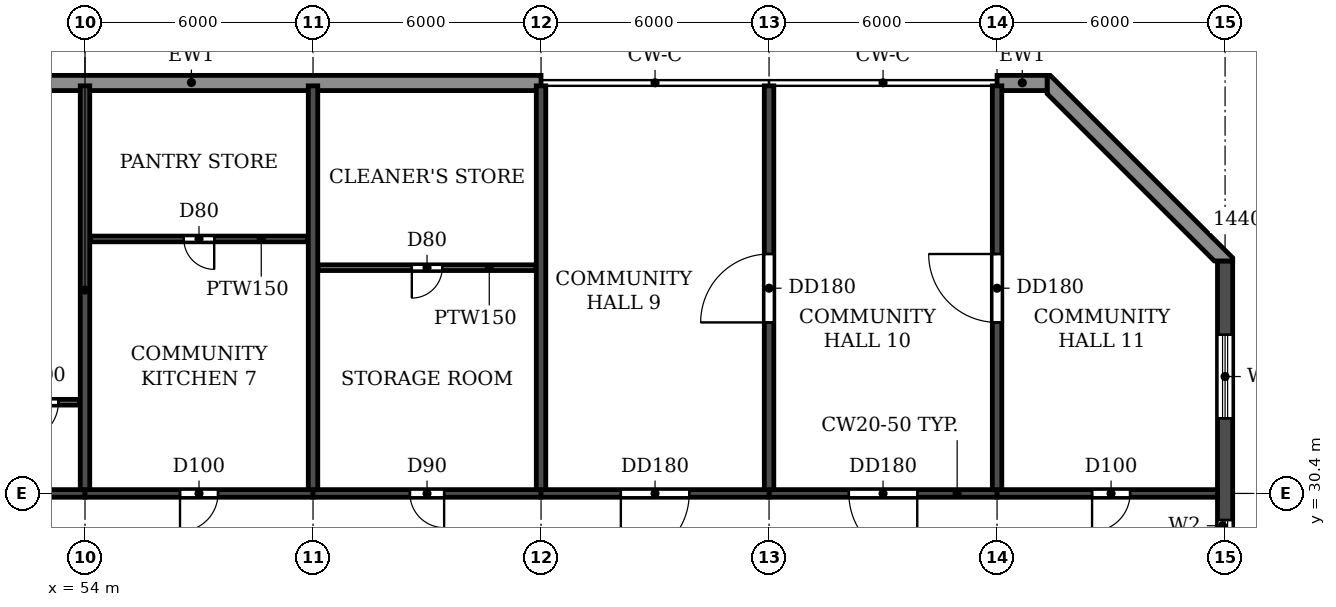
"""IFC4 building model, lengths in metres.
Left out: names, types, materials, properties, quantities, classifications, styles, units other than length and angle.
Written with IfcOpenShell. Run it as: python <this file> out.ifc"""

import sys

from ifc_helpers import new_model, si_unit, direction, frame, frame_2d, origin, place, context, subcontext, project, spatial, polyline, rectangle, outline, extrude, element, fill, save


model = new_model("IFC4")
c1 = context("Model", 3, precision=1e-05, world=origin(), true_north=direction((0.0, 1.0)))
c2 = subcontext(c1, "Body", "Model", "MODEL_VIEW")
j1 = project(units=[si_unit("LENGTHUNIT", "METRE"), si_unit("PLANEANGLEUNIT", "RADIAN")], contexts=[c1])
p1 = place(None, origin())
s1 = spatial("IfcSite", under=j1, at=p1, CompositionType="ELEMENT")
p2 = place(p1, origin())
s2 = spatial("IfcBuilding", under=s1, at=p2, CompositionType="ELEMENT")
p3 = place(p2, frame((0.0, 0.0, 211.5)))
s3 = spatial("IfcBuildingStorey", under=s2, at=p3, CompositionType="ELEMENT", Elevation=211.5)
for number, where, z_axis, x_axis in (
    (1, (54.0, 30.5, 0.0), (0.0, 0.0, 1.0), (0.0, 1.0, 0.0)),
    (2, (60.0, 30.5, 0.0), (0.0, 0.0, 1.0), (0.0, 1.0, 0.0)),
    (3, (66.0, 30.5, 0.0), (0.0, 0.0, 1.0), (0.0, 1.0, 0.0)),
):
    element("IfcWall", number, at=place(p3, frame(where, z_axis=z_axis, x_axis=x_axis)), inside=s3, PredefinedType="SHEAR", context=c2, shape_type="SweptSolid", body=[
        extrude(rectangle(XDim=10.625, YDim=0.25, at=frame_2d((5.312, 0.0))), origin(), (0.0, 0.0, 1.0), 2.95),
    ])
p4 = place(p3, frame((72.0, 30.5, 0.0), z_axis=(0.0, 0.0, 1.0), x_axis=(0.0, 1.0, 0.0)))
e4 = element("IfcWall", 4, at=p4, inside=s3, PredefinedType="SHEAR", context=c2, shape_type="SweptSolid", body=[
    extrude(rectangle(XDim=10.625, YDim=0.25, at=frame_2d((5.312, 0.0))), origin(), (0.0, 0.0, 1.0), 2.95),
])
p5 = place(p4, frame((4.4, 0.0, 0.0)))
e5 = element("IfcOpeningElement", 5, at=p5, cuts=e4, PredefinedType="OPENING", context=c2, shape_type="SweptSolid", body=[
    extrude(rectangle(XDim=1.8, YDim=2.1, at=frame_2d((0.9, 1.05))), frame((0.0, 0.135, 0.0), z_axis=(0.0, -1.0, 0.0), x_axis=(1.0, 0.0, 0.0)), (0.0, 0.0, 1.0), 0.27),
])
p6 = place(p3, frame((78.0, 30.5, 0.0), z_axis=(0.0, 0.0, 1.0), x_axis=(0.0, 1.0, 0.0)))
e6 = element("IfcWall", 6, at=p6, inside=s3, PredefinedType="SHEAR", context=c2, shape_type="SweptSolid", body=[
    extrude(rectangle(XDim=10.625, YDim=0.25, at=frame_2d((5.312, 0.0))), origin(), (0.0, 0.0, 1.0), 2.95),
])
p7 = place(p6, frame((4.4, 0.0, 0.0)))
e7 = element("IfcOpeningElement", 7, at=p7, cuts=e6, PredefinedType="OPENING", context=c2, shape_type="SweptSolid", body=[
    extrude(rectangle(XDim=1.8, YDim=2.1, at=frame_2d((0.9, 1.05))), frame((0.0, 0.135, 0.0), z_axis=(0.0, -1.0, 0.0), x_axis=(1.0, 0.0, 0.0)), (0.0, 0.0, 1.0), 0.27),
])
p8 = place(p3, frame((84.0, 4.683, 0.0), z_axis=(0.0, 0.0, 1.0), x_axis=(0.0, 1.0, 0.0)))
e8 = element("IfcWall", 8, at=p8, inside=s3, PredefinedType="SHEAR", context=c2, shape_type="SweptSolid", body=[
    extrude(rectangle(XDim=31.834, YDim=0.4, at=frame_2d((15.917, 0.0))), origin(), (0.0, 0.0, 1.0), 2.95),
])
p9 = place(p8, frame((23.817, 0.0, 0.9)))
e9 = element("IfcOpeningElement", 9, at=p9, cuts=e8, PredefinedType="OPENING", context=c2, shape_type="SweptSolid", body=[
    extrude(rectangle(XDim=1.2, YDim=1.5, at=frame_2d((0.6, 0.75))), frame((0.0, 0.21, 0.0), z_axis=(0.0, -1.0, 0.0), x_axis=(1.0, 0.0, 0.0)), (0.0, 0.0, 1.0), 0.42),
])
p10 = place(p8, frame((8.017, 0.0, 0.9)))
e10 = element("IfcOpeningElement", 10, at=p10, cuts=e8, PredefinedType="OPENING", context=c2, shape_type="SweptSolid", body=[
    extrude(rectangle(XDim=1.2, YDim=1.5, at=frame_2d((0.6, 0.75))), frame((0.0, 0.21, 0.0), z_axis=(0.0, -1.0, 0.0), x_axis=(1.0, 0.0, 0.0)), (0.0, 0.0, 1.0), 0.42),
])
p11 = place(p8, frame((27.694, 0.0, 0.6)))
e11 = element("IfcOpeningElement", 11, at=p11, cuts=e8, PredefinedType="OPENING", context=c2, shape_type="SweptSolid", body=[
    extrude(rectangle(XDim=2.2, YDim=1.8, at=frame_2d((1.1, 0.9))), frame((0.0, 0.21, 0.0), z_axis=(0.0, -1.0, 0.0), x_axis=(1.0, 0.0, 0.0)), (0.0, 0.0, 1.0), 0.42),
])
p12 = place(p8, frame((15.917, 0.0, 0.9)))
e12 = element("IfcOpeningElement", 12, at=p12, cuts=e8, PredefinedType="OPENING", context=c2, shape_type="SweptSolid", body=[
    extrude(rectangle(XDim=1.2, YDim=1.5, at=frame_2d((0.6, 0.75))), frame((0.0, 0.21, 0.0), z_axis=(0.0, -1.0, 0.0), x_axis=(1.0, 0.0, 0.0)), (0.0, 0.0, 1.0), 0.42),
])
p13 = place(p3, frame((48.0, 30.4, 0.0), z_axis=(0.0, 0.0, 1.0), x_axis=(1.0, 0.0, 0.0)))
e13 = element("IfcWall", 13, at=p13, inside=s3, PredefinedType="SHEAR", context=c2, shape_type="SweptSolid", body=[
    extrude(rectangle(XDim=6.0, YDim=0.2, at=frame_2d((3.0, 0.0))), origin(), (0.0, 0.0, 1.0), 2.35),
])
p14 = place(p13, frame((2.55, 0.0, 0.0)))
e14 = element("IfcOpeningElement", 14, at=p14, cuts=e13, PredefinedType="OPENING", context=c2, shape_type="SweptSolid", body=[
    extrude(rectangle(XDim=0.9, YDim=2.1, at=frame_2d((0.45, 1.05))), frame((0.0, 0.11, 0.0), z_axis=(0.0, -1.0, 0.0), x_axis=(1.0, 0.0, 0.0)), (0.0, 0.0, 1.0), 0.22),
])
p15 = place(p3, frame((54.0, 30.4, 0.0), z_axis=(0.0, 0.0, 1.0), x_axis=(1.0, 0.0, 0.0)))
e15 = element("IfcWall", 15, at=p15, inside=s3, PredefinedType="SHEAR", context=c2, shape_type="SweptSolid", body=[
    extrude(rectangle(XDim=6.0, YDim=0.2, at=frame_2d((3.0, 0.0))), origin(), (0.0, 0.0, 1.0), 2.35),
])
p16 = place(p15, frame((2.5, 0.0, 0.0)))
e16 = element("IfcOpeningElement", 16, at=p16, cuts=e15, PredefinedType="OPENING", context=c2, shape_type="SweptSolid", body=[
    extrude(rectangle(XDim=1.0, YDim=2.1, at=frame_2d((0.5, 1.05))), frame((0.0, 0.11, 0.0), z_axis=(0.0, -1.0, 0.0), x_axis=(1.0, 0.0, 0.0)), (0.0, 0.0, 1.0), 0.22),
])
p17 = place(p3, frame((60.0, 30.4, 0.0), z_axis=(0.0, 0.0, 1.0), x_axis=(1.0, 0.0, 0.0)))
e17 = element("IfcWall", 17, at=p17, inside=s3, PredefinedType="SHEAR", context=c2, shape_type="SweptSolid", body=[
    extrude(rectangle(XDim=6.0, YDim=0.2, at=frame_2d((3.0, 0.0))), origin(), (0.0, 0.0, 1.0), 2.35),
])
p18 = place(p17, frame((2.55, 0.0, 0.0)))
e18 = element("IfcOpeningElement", 18, at=p18, cuts=e17, PredefinedType="OPENING", context=c2, shape_type="SweptSolid", body=[
    extrude(rectangle(XDim=0.9, YDim=2.1, at=frame_2d((0.45, 1.05))), frame((0.0, 0.11, 0.0), z_axis=(0.0, -1.0, 0.0), x_axis=(1.0, 0.0, 0.0)), (0.0, 0.0, 1.0), 0.22),
])
p19 = place(p3, frame((66.0, 30.4, 0.0), z_axis=(0.0, 0.0, 1.0), x_axis=(1.0, 0.0, 0.0)))
e19 = element("IfcWall", 19, at=p19, inside=s3, PredefinedType="SHEAR", context=c2, shape_type="SweptSolid", body=[
    extrude(rectangle(XDim=6.0, YDim=0.2, at=frame_2d((3.0, 0.0))), origin(), (0.0, 0.0, 1.0), 2.35),
])
p20 = place(p19, frame((2.1, 0.0, 0.0)))
e20 = element("IfcOpeningElement", 20, at=p20, cuts=e19, PredefinedType="OPENING", context=c2, shape_type="SweptSolid", body=[
    extrude(rectangle(XDim=1.8, YDim=2.1, at=frame_2d((0.9, 1.05))), frame((0.0, 0.11, 0.0), z_axis=(0.0, -1.0, 0.0), x_axis=(1.0, 0.0, 0.0)), (0.0, 0.0, 1.0), 0.22),
])
p21 = place(p3, frame((72.0, 30.4, 0.0), z_axis=(0.0, 0.0, 1.0), x_axis=(1.0, 0.0, 0.0)))
e21 = element("IfcWall", 21, at=p21, inside=s3, PredefinedType="SHEAR", context=c2, shape_type="SweptSolid", body=[
    extrude(rectangle(XDim=6.0, YDim=0.2, at=frame_2d((3.0, 0.0))), origin(), (0.0, 0.0, 1.0), 2.35),
])
p22 = place(p21, frame((2.1, 0.0, 0.0)))
e22 = element("IfcOpeningElement", 22, at=p22, cuts=e21, PredefinedType="OPENING", context=c2, shape_type="SweptSolid", body=[
    extrude(rectangle(XDim=1.8, YDim=2.1, at=frame_2d((0.9, 1.05))), frame((0.0, 0.11, 0.0), z_axis=(0.0, -1.0, 0.0), x_axis=(1.0, 0.0, 0.0)), (0.0, 0.0, 1.0), 0.22),
])
p23 = place(p3, frame((78.0, 30.4, 0.0), z_axis=(0.0, 0.0, 1.0), x_axis=(1.0, 0.0, 0.0)))
e23 = element("IfcWall", 23, at=p23, inside=s3, PredefinedType="SHEAR", context=c2, shape_type="SweptSolid", body=[
    extrude(rectangle(XDim=5.8, YDim=0.2, at=frame_2d((2.9, 0.0))), origin(), (0.0, 0.0, 1.0), 2.35),
])
p24 = place(p23, frame((2.5, 0.0, 0.0)))
e24 = element("IfcOpeningElement", 24, at=p24, cuts=e23, PredefinedType="OPENING", context=c2, shape_type="SweptSolid", body=[
    extrude(rectangle(XDim=1.0, YDim=2.1, at=frame_2d((0.5, 1.05))), frame((0.0, 0.11, 0.0), z_axis=(0.0, -1.0, 0.0), x_axis=(1.0, 0.0, 0.0)), (0.0, 0.0, 1.0), 0.22),
])
p25 = place(p3, origin())
e25 = element("IfcWall", 25, at=p25, inside=s3, PredefinedType="STANDARD", context=c2, shape_type="SweptSolid", body=[
    extrude(outline(polyline([(84.2, 36.517), (84.2, 36.6), (79.4, 41.4), (79.317, 41.4), (79.317, 40.917), (83.717, 36.517), (84.2, 36.517)])), origin(), (0.0, 0.0, 1.0), 2.95),
])
p26 = place(p3, frame((79.317, 41.2, 0.0), z_axis=(0.0, 0.0, 1.0), x_axis=(-1.0, 0.0, 0.0)))
e26 = element("IfcWall", 26, at=p26, inside=s3, PredefinedType="STANDARD", context=c2, shape_type="SweptSolid", body=[
    extrude(rectangle(XDim=1.317, YDim=0.4, at=frame_2d((0.659, 0.0))), origin(), (0.0, 0.0, 1.0), 2.95),
])
p27 = place(p3, frame((66.0, 41.2, 0.0), z_axis=(0.0, 0.0, 1.0), x_axis=(-1.0, 0.0, 0.0)))
e27 = element("IfcWall", 27, at=p27, inside=s3, PredefinedType="STANDARD", context=c2, shape_type="SweptSolid", body=[
    extrude(rectangle(XDim=36.0, YDim=0.4, at=frame_2d((18.0, 0.0))), origin(), (0.0, 0.0, 1.0), 2.95),
])
p28 = place(p27, frame((33.4, 0.0, 0.6)))
e28 = element("IfcOpeningElement", 28, at=p28, cuts=e27, PredefinedType="OPENING", context=c2, shape_type="SweptSolid", body=[
    extrude(rectangle(XDim=2.2, YDim=1.8, at=frame_2d((1.1, 0.9))), frame((0.0, 0.21, 0.0), z_axis=(0.0, -1.0, 0.0), x_axis=(1.0, 0.0, 0.0)), (0.0, 0.0, 1.0), 0.42),
])
p29 = place(p27, frame((30.4, 0.0, 0.6)))
e29 = element("IfcOpeningElement", 29, at=p29, cuts=e27, PredefinedType="OPENING", context=c2, shape_type="SweptSolid", body=[
    extrude(rectangle(XDim=2.2, YDim=1.8, at=frame_2d((1.1, 0.9))), frame((0.0, 0.21, 0.0), z_axis=(0.0, -1.0, 0.0), x_axis=(1.0, 0.0, 0.0)), (0.0, 0.0, 1.0), 0.42),
])
p30 = place(p27, frame((21.4, 0.0, 0.6)))
e30 = element("IfcOpeningElement", 30, at=p30, cuts=e27, PredefinedType="OPENING", context=c2, shape_type="SweptSolid", body=[
    extrude(rectangle(XDim=2.2, YDim=1.8, at=frame_2d((1.1, 0.9))), frame((0.0, 0.21, 0.0), z_axis=(0.0, -1.0, 0.0), x_axis=(1.0, 0.0, 0.0)), (0.0, 0.0, 1.0), 0.42),
])
p31 = place(p27, frame((18.4, 0.0, 0.6)))
e31 = element("IfcOpeningElement", 31, at=p31, cuts=e27, PredefinedType="OPENING", context=c2, shape_type="SweptSolid", body=[
    extrude(rectangle(XDim=2.2, YDim=1.8, at=frame_2d((1.1, 0.9))), frame((0.0, 0.21, 0.0), z_axis=(0.0, -1.0, 0.0), x_axis=(1.0, 0.0, 0.0)), (0.0, 0.0, 1.0), 0.42),
])
p32 = place(p3, frame((48.135, 32.8, 0.0), z_axis=(0.0, 0.0, 1.0), x_axis=(1.0, 0.0, 0.0)))
e32 = element("IfcWall", 32, at=p32, inside=s3, PredefinedType="PARTITIONING", context=c2, shape_type="SweptSolid", body=[
    extrude(rectangle(XDim=5.73, YDim=0.15, at=frame_2d((2.865, 0.0))), origin(), (0.0, 0.0, 1.0), 2.95),
])
p33 = place(p32, frame((1.165, 0.0, 0.0)))
e33 = element("IfcOpeningElement", 33, at=p33, cuts=e32, PredefinedType="OPENING", context=c2, shape_type="SweptSolid", body=[
    extrude(rectangle(XDim=1.0, YDim=2.1, at=frame_2d((0.5, 1.05))), frame((0.0, 0.085, 0.0), z_axis=(0.0, -1.0, 0.0), x_axis=(1.0, 0.0, 0.0)), (0.0, 0.0, 1.0), 0.17),
])
p34 = place(p32, frame((4.165, 0.0, 0.0)))
e34 = element("IfcOpeningElement", 34, at=p34, cuts=e32, PredefinedType="OPENING", context=c2, shape_type="SweptSolid", body=[
    extrude(rectangle(XDim=1.0, YDim=2.1, at=frame_2d((0.5, 1.05))), frame((0.0, 0.085, 0.0), z_axis=(0.0, -1.0, 0.0), x_axis=(1.0, 0.0, 0.0)), (0.0, 0.0, 1.0), 0.17),
])
p35 = place(p3, frame((60.135, 36.34, 0.0), z_axis=(0.0, 0.0, 1.0), x_axis=(1.0, 0.0, 0.0)))
e35 = element("IfcWall", 35, at=p35, inside=s3, PredefinedType="PARTITIONING", context=c2, shape_type="SweptSolid", body=[
    extrude(rectangle(XDim=5.73, YDim=0.15, at=frame_2d((2.865, 0.0))), origin(), (0.0, 0.0, 1.0), 2.95),
])
p36 = place(p35, frame((2.465, 0.0, 0.0)))
e36 = element("IfcOpeningElement", 36, at=p36, cuts=e35, PredefinedType="OPENING", context=c2, shape_type="SweptSolid", body=[
    extrude(rectangle(XDim=0.8, YDim=2.1, at=frame_2d((0.4, 1.05))), frame((0.0, 0.085, 0.0), z_axis=(0.0, -1.0, 0.0), x_axis=(1.0, 0.0, 0.0)), (0.0, 0.0, 1.0), 0.17),
])
p37 = place(p3, frame((54.135, 37.096, 0.0), z_axis=(0.0, 0.0, 1.0), x_axis=(1.0, 0.0, 0.0)))
e37 = element("IfcWall", 37, at=p37, inside=s3, PredefinedType="PARTITIONING", context=c2, shape_type="SweptSolid", body=[
    extrude(rectangle(XDim=5.73, YDim=0.15, at=frame_2d((2.865, 0.0))), origin(), (0.0, 0.0, 1.0), 2.95),
])
p38 = place(p37, frame((2.465, 0.0, 0.0)))
e38 = element("IfcOpeningElement", 38, at=p38, cuts=e37, PredefinedType="OPENING", context=c2, shape_type="SweptSolid", body=[
    extrude(rectangle(XDim=0.8, YDim=2.1, at=frame_2d((0.4, 1.05))), frame((0.0, 0.085, 0.0), z_axis=(0.0, -1.0, 0.0), x_axis=(1.0, 0.0, 0.0)), (0.0, 0.0, 1.0), 0.17),
])
p39 = place(p9, origin())
e39 = element("IfcWindow", 39, at=p39, inside=s3, PartitioningType="SINGLE_PANEL", PredefinedType="WINDOW", context=c2, shape_type="SweptSolid", body=[
    extrude(rectangle(XDim=1.2, YDim=1.5, at=frame_2d((0.6, 0.75))), frame((0.0, 0.03, 0.0), z_axis=(0.0, -1.0, 0.0), x_axis=(1.0, 0.0, 0.0)), (0.0, 0.0, 1.0), 0.06),
])
fill(e9, e39)
p40 = place(p11, origin())
e40 = element("IfcWindow", 40, at=p40, inside=s3, PartitioningType="DOUBLE_PANEL_HORIZONTAL", PredefinedType="WINDOW", context=c2, shape_type="SweptSolid", body=[
    extrude(rectangle(XDim=2.2, YDim=1.8, at=frame_2d((1.1, 0.9))), frame((0.0, 0.03, 0.0), z_axis=(0.0, -1.0, 0.0), x_axis=(1.0, 0.0, 0.0)), (0.0, 0.0, 1.0), 0.06),
])
fill(e11, e40)
p41 = place(p16, frame((1.0, 0.0, 0.0), z_axis=(0.0, 0.0, 1.0), x_axis=(-1.0, 0.0, 0.0)))
e41 = element("IfcDoor", 41, at=p41, inside=s3, OperationType="SINGLE_SWING_RIGHT", PredefinedType="DOOR", context=c2, shape_type="SweptSolid", body=[
    extrude(rectangle(XDim=1.0, YDim=2.1, at=frame_2d((0.5, 1.05))), frame((0.0, 0.025, 0.0), z_axis=(0.0, -1.0, 0.0), x_axis=(1.0, 0.0, 0.0)), (0.0, 0.0, 1.0), 0.05),
])
fill(e16, e41)
p42 = place(p18, frame((0.9, 0.0, 0.0), z_axis=(0.0, 0.0, 1.0), x_axis=(-1.0, 0.0, 0.0)))
e42 = element("IfcDoor", 42, at=p42, inside=s3, OperationType="SINGLE_SWING_LEFT", PredefinedType="DOOR", context=c2, shape_type="SweptSolid", body=[
    extrude(rectangle(XDim=0.9, YDim=2.1, at=frame_2d((0.45, 1.05))), frame((0.0, 0.025, 0.0), z_axis=(0.0, -1.0, 0.0), x_axis=(1.0, 0.0, 0.0)), (0.0, 0.0, 1.0), 0.05),
])
fill(e18, e42)
p43 = place(p20, frame((1.8, 0.0, 0.0), z_axis=(0.0, 0.0, 1.0), x_axis=(-1.0, 0.0, 0.0)))
e43 = element("IfcDoor", 43, at=p43, inside=s3, OperationType="DOUBLE_DOOR_SINGLE_SWING", PredefinedType="DOOR", context=c2, shape_type="SweptSolid", body=[
    extrude(rectangle(XDim=1.8, YDim=2.1, at=frame_2d((0.9, 1.05))), frame((0.0, 0.025, 0.0), z_axis=(0.0, -1.0, 0.0), x_axis=(1.0, 0.0, 0.0)), (0.0, 0.0, 1.0), 0.05),
])
fill(e20, e43)
p44 = place(p22, frame((1.8, 0.0, 0.0), z_axis=(0.0, 0.0, 1.0), x_axis=(-1.0, 0.0, 0.0)))
e44 = element("IfcDoor", 44, at=p44, inside=s3, OperationType="DOUBLE_DOOR_SINGLE_SWING", PredefinedType="DOOR", context=c2, shape_type="SweptSolid", body=[
    extrude(rectangle(XDim=1.8, YDim=2.1, at=frame_2d((0.9, 1.05))), frame((0.0, 0.025, 0.0), z_axis=(0.0, -1.0, 0.0), x_axis=(1.0, 0.0, 0.0)), (0.0, 0.0, 1.0), 0.05),
])
fill(e22, e44)
p45 = place(p24, frame((1.0, 0.0, 0.0), z_axis=(0.0, 0.0, 1.0), x_axis=(-1.0, 0.0, 0.0)))
e45 = element("IfcDoor", 45, at=p45, inside=s3, OperationType="SINGLE_SWING_RIGHT", PredefinedType="DOOR", context=c2, shape_type="SweptSolid", body=[
    extrude(rectangle(XDim=1.0, YDim=2.1, at=frame_2d((0.5, 1.05))), frame((0.0, 0.025, 0.0), z_axis=(0.0, -1.0, 0.0), x_axis=(1.0, 0.0, 0.0)), (0.0, 0.0, 1.0), 0.05),
])
fill(e24, e45)
p46 = place(p34, frame((1.0, 0.0, 0.0), z_axis=(0.0, 0.0, 1.0), x_axis=(-1.0, 0.0, 0.0)))
e46 = element("IfcDoor", 46, at=p46, inside=s3, OperationType="SINGLE_SWING_RIGHT", PredefinedType="DOOR", context=c2, shape_type="SweptSolid", body=[
    extrude(rectangle(XDim=1.0, YDim=2.1, at=frame_2d((0.5, 1.05))), frame((0.0, 0.025, 0.0), z_axis=(0.0, -1.0, 0.0), x_axis=(1.0, 0.0, 0.0)), (0.0, 0.0, 1.0), 0.05),
])
fill(e34, e46)
p47 = place(p38, frame((0.8, 0.0, 0.0), z_axis=(0.0, 0.0, 1.0), x_axis=(-1.0, 0.0, 0.0)))
e47 = element("IfcDoor", 47, at=p47, inside=s3, OperationType="SINGLE_SWING_LEFT", PredefinedType="DOOR", context=c2, shape_type="SweptSolid", body=[
    extrude(rectangle(XDim=0.8, YDim=2.1, at=frame_2d((0.4, 1.05))), frame((0.0, 0.025, 0.0), z_axis=(0.0, -1.0, 0.0), x_axis=(1.0, 0.0, 0.0)), (0.0, 0.0, 1.0), 0.05),
])
fill(e38, e47)
p48 = place(p36, frame((0.8, 0.0, 0.0), z_axis=(0.0, 0.0, 1.0), x_axis=(-1.0, 0.0, 0.0)))
e48 = element("IfcDoor", 48, at=p48, inside=s3, OperationType="SINGLE_SWING_RIGHT", PredefinedType="DOOR", context=c2, shape_type="SweptSolid", body=[
    extrude(rectangle(XDim=0.8, YDim=2.1, at=frame_2d((0.4, 1.05))), frame((0.0, 0.025, 0.0), z_axis=(0.0, -1.0, 0.0), x_axis=(1.0, 0.0, 0.0)), (0.0, 0.0, 1.0), 0.05),
])
fill(e36, e48)
p49 = place(p5, origin())
e49 = element("IfcDoor", 49, at=p49, inside=s3, OperationType="DOUBLE_DOOR_SINGLE_SWING", PredefinedType="DOOR", context=c2, shape_type="SweptSolid", body=[
    extrude(rectangle(XDim=1.8, YDim=2.1, at=frame_2d((0.9, 1.05))), frame((0.0, 0.025, 0.0), z_axis=(0.0, -1.0, 0.0), x_axis=(1.0, 0.0, 0.0)), (0.0, 0.0, 1.0), 0.05),
])
fill(e5, e49)
p50 = place(p7, origin())
e50 = element("IfcDoor", 50, at=p50, inside=s3, OperationType="DOUBLE_DOOR_SINGLE_SWING", PredefinedType="DOOR", context=c2, shape_type="SweptSolid", body=[
    extrude(rectangle(XDim=1.8, YDim=2.1, at=frame_2d((0.9, 1.05))), frame((0.0, 0.025, 0.0), z_axis=(0.0, -1.0, 0.0), x_axis=(1.0, 0.0, 0.0)), (0.0, 0.0, 1.0), 0.05),
])
fill(e7, e50)
save(model, sys.argv[1])
